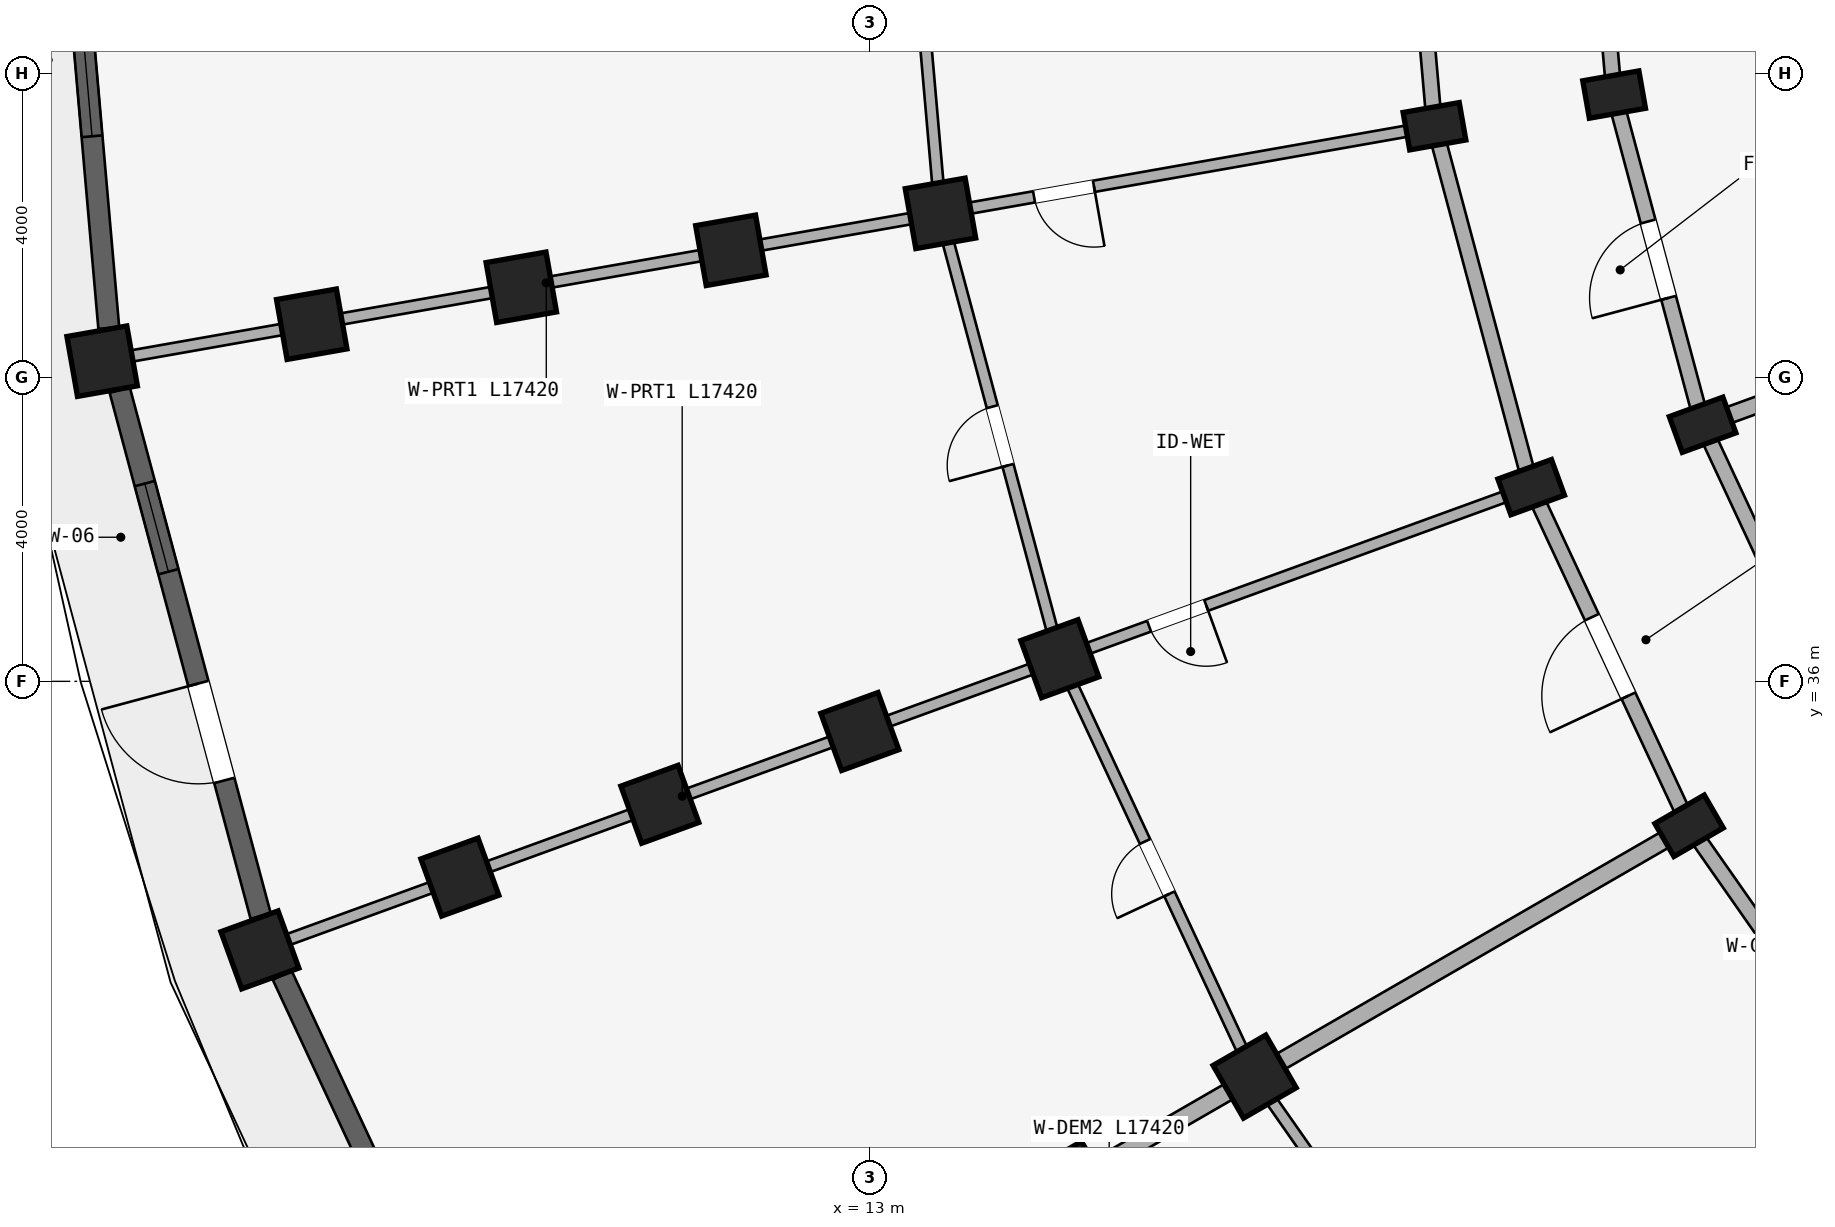
"""IFC4 building model, lengths in metres.
Left out: names, types, materials, properties, quantities, classifications, styles, units other than length and angle.
Written with IfcOpenShell. Run it as: python <this file> out.ifc"""

import sys

from ifc_helpers import new_model, si_unit, direction, frame, frame_2d, origin, origin_2d, place, context, subcontext, project, spatial, rectangle, extrude, element, fill, save


model = new_model("IFC4")
c1 = context("Model", 3, precision=1e-05, world=origin(), true_north=direction((0.0, 1.0)))
c2 = subcontext(c1, "Body", "Model", "MODEL_VIEW")
j1 = project(units=[si_unit("LENGTHUNIT", "METRE"), si_unit("PLANEANGLEUNIT", "RADIAN")], contexts=[c1])
p1 = place(None, origin())
s1 = spatial("IfcSite", under=j1, at=p1, CompositionType="ELEMENT")
p2 = place(p1, origin())
s2 = spatial("IfcBuilding", under=s1, at=p2, CompositionType="ELEMENT")
p3 = place(p2, frame((0.0, 0.0, 8.7)))
s3 = spatial("IfcBuildingStorey", under=s2, at=p3, CompositionType="ELEMENT", Elevation=8.7)
p4 = place(p3, frame((23.778, 34.1, 0.0), z_axis=(0.0, 0.0, 1.0), x_axis=(-0.5, 0.866025403784, 0.0)))
e1 = element("IfcColumn", 1, at=p4, inside=s3, PredefinedType="COLUMN", context=c2, shape_type="SweptSolid", body=[
    extrude(rectangle(XDim=0.5, YDim=0.75, at=origin_2d()), origin(), (0.0, 0.0, 1.0), 2.93),
])
for number, where, z_axis, x_axis in (
    (2, (18.062, 30.8, 0.0), (0.0, 0.0, 1.0), (-0.5, 0.866, 0.0)),
    (3, (15.637, 29.4, 0.0), (0.0, 0.0, 1.0), (-0.5, 0.866, 0.0)),
):
    element("IfcColumn", number, at=place(p3, frame(where, z_axis=z_axis, x_axis=x_axis)), inside=s3, PredefinedType="COLUMN", context=c2, shape_type="SweptSolid", body=[
        extrude(rectangle(XDim=0.8, YDim=0.8, at=origin_2d()), origin(), (0.0, 0.0, 1.0), 2.93),
    ])
for number, where, z_axis, x_axis in (
    (4, (23.956, 39.376, 0.0), (0.0, 0.0, 1.0), (-0.342, 0.94, 0.0)),
    (5, (21.701, 38.555, 0.0), (0.0, 0.0, 1.0), (-0.342, 0.94, 0.0)),
):
    element("IfcColumn", number, at=place(p3, frame(where, z_axis=z_axis, x_axis=x_axis)), inside=s3, PredefinedType="COLUMN", context=c2, shape_type="SweptSolid", body=[
        extrude(rectangle(XDim=0.5, YDim=0.75, at=origin_2d()), origin(), (0.0, 0.0, 1.0), 2.93),
    ])
for number, where, z_axis, x_axis in (
    (6, (15.499, 36.298, 0.0), (0.0, 0.0, 1.0), (-0.342, 0.94, 0.0)),
    (7, (12.868, 35.34, 0.0), (0.0, 0.0, 1.0), (-0.342, 0.94, 0.0)),
    (8, (10.236, 34.382, 0.0), (0.0, 0.0, 1.0), (-0.342, 0.94, 0.0)),
    (9, (7.605, 33.425, 0.0), (0.0, 0.0, 1.0), (-0.342, 0.94, 0.0)),
    (10, (4.974, 32.467, 0.0), (0.0, 0.0, 1.0), (-0.342, 0.94, 0.0)),
):
    element("IfcColumn", number, at=place(p3, frame(where, z_axis=z_axis, x_axis=x_axis)), inside=s3, PredefinedType="COLUMN", context=c2, shape_type="SweptSolid", body=[
        extrude(rectangle(XDim=0.8, YDim=0.8, at=origin_2d()), origin(), (0.0, 0.0, 1.0), 2.93),
    ])
for number, where, z_axis, x_axis in (
    (11, (22.792, 43.72, 0.0), (0.0, 0.0, 1.0), (-0.174, 0.985, 0.0)),
    (12, (20.428, 43.303, 0.0), (0.0, 0.0, 1.0), (-0.174, 0.985, 0.0)),
):
    element("IfcColumn", number, at=place(p3, frame(where, z_axis=z_axis, x_axis=x_axis)), inside=s3, PredefinedType="COLUMN", context=c2, shape_type="SweptSolid", body=[
        extrude(rectangle(XDim=0.5, YDim=0.75, at=origin_2d()), origin(), (0.0, 0.0, 1.0), 2.93),
    ])
for number, where, z_axis, x_axis in (
    (13, (13.929, 42.157, 0.0), (0.0, 0.0, 1.0), (-0.174, 0.985, 0.0)),
    (14, (11.171, 41.671, 0.0), (0.0, 0.0, 1.0), (-0.174, 0.985, 0.0)),
    (15, (8.414, 41.185, 0.0), (0.0, 0.0, 1.0), (-0.174, 0.985, 0.0)),
    (16, (5.656, 40.698, 0.0), (0.0, 0.0, 1.0), (-0.174, 0.985, 0.0)),
    (17, (2.899, 40.212, 0.0), (0.0, 0.0, 1.0), (-0.174, 0.985, 0.0)),
):
    element("IfcColumn", number, at=place(p3, frame(where, z_axis=z_axis, x_axis=x_axis)), inside=s3, PredefinedType="COLUMN", context=c2, shape_type="SweptSolid", body=[
        extrude(rectangle(XDim=0.8, YDim=0.8, at=origin_2d()), origin(), (0.0, 0.0, 1.0), 2.93),
    ])
p5 = place(p3, frame((26.598, 30.073, 0.0), z_axis=(0.0, 0.0, 1.0), x_axis=(-0.573592335331, 0.819140911474, 0.0)))
e18 = element("IfcWall", 18, at=p5, inside=s3, PredefinedType="STANDARD", context=c2, shape_type="SweptSolid", body=[
    extrude(rectangle(XDim=4.916, YDim=0.2, at=frame_2d((2.458, 0.0))), origin(), (0.0, 0.0, 1.0), 2.372),
])
p6 = place(p3, frame((25.856, 35.3, 0.0), z_axis=(0.0, 0.0, 1.0), x_axis=(-0.422617978463, 0.906307919131, 0.0)))
e19 = element("IfcWall", 19, at=p6, inside=s3, PredefinedType="STANDARD", context=c2, shape_type="SweptSolid", body=[
    extrude(rectangle(XDim=4.497, YDim=0.2, at=frame_2d((2.249, 0.0))), origin(), (0.0, 0.0, 1.0), 2.372),
])
p7 = place(p3, frame((23.778, 34.1, 0.0), z_axis=(0.0, 0.0, 1.0), x_axis=(-0.422629854778, 0.906302381024, 0.0)))
e20 = element("IfcWall", 20, at=p7, inside=s3, PredefinedType="STANDARD", context=c2, shape_type="SweptSolid", body=[
    extrude(rectangle(XDim=4.915, YDim=0.2, at=frame_2d((2.458, 0.0))), origin(), (0.0, 0.0, 1.0), 2.372),
])
p8 = place(p7, frame((1.888, 0.0, 0.0)))
e21 = element("IfcOpeningElement", 21, at=p8, cuts=e20, PredefinedType="OPENING", context=c2, shape_type="SweptSolid", body=[
    extrude(rectangle(XDim=1.14, YDim=2.15, at=frame_2d((0.57, 1.075))), frame((0.0, 0.11, 0.0), z_axis=(0.0, -1.0, 0.0), x_axis=(1.0, 0.0, 0.0)), (0.0, 0.0, 1.0), 0.22),
])
p9 = place(p3, frame((23.956, 39.376, 0.0), z_axis=(0.0, 0.0, 1.0), x_axis=(-0.258787642463, 0.965934240054, 0.0)))
e22 = element("IfcWall", 22, at=p9, inside=s3, PredefinedType="STANDARD", context=c2, shape_type="SweptSolid", body=[
    extrude(rectangle(XDim=4.497, YDim=0.2, at=frame_2d((2.249, 0.0))), origin(), (0.0, 0.0, 1.0), 2.372),
])
p10 = place(p9, frame((1.729, 0.0, 0.0)))
e23 = element("IfcOpeningElement", 23, at=p10, cuts=e22, PredefinedType="OPENING", context=c2, shape_type="SweptSolid", body=[
    extrude(rectangle(XDim=1.04, YDim=2.15, at=frame_2d((0.52, 1.075))), frame((0.0, 0.11, 0.0), z_axis=(0.0, -1.0, 0.0), x_axis=(1.0, 0.0, 0.0)), (0.0, 0.0, 1.0), 0.22),
])
p11 = place(p3, frame((21.701, 38.555, 0.0), z_axis=(0.0, 0.0, 1.0), x_axis=(-0.258803112091, 0.965930095386, 0.0)))
e24 = element("IfcWall", 24, at=p11, inside=s3, PredefinedType="STANDARD", context=c2, shape_type="SweptSolid", body=[
    extrude(rectangle(XDim=4.916, YDim=0.2, at=frame_2d((2.458, 0.0))), origin(), (0.0, 0.0, 1.0), 2.372),
])
p12 = place(p3, frame((22.792, 43.72, 0.0), z_axis=(0.0, 0.0, 1.0), x_axis=(-0.087187153726, 0.996191949488, 0.0)))
e25 = element("IfcWall", 25, at=p12, inside=s3, PredefinedType="STANDARD", context=c2, shape_type="SweptSolid", body=[
    extrude(rectangle(XDim=4.497, YDim=0.2, at=frame_2d((2.249, 0.0))), origin(), (0.0, 0.0, 1.0), 2.372),
])
p13 = place(p3, frame((20.428, 43.303, 0.0), z_axis=(0.0, 0.0, 1.0), x_axis=(-0.087167566415, 0.996193663584, 0.0)))
e26 = element("IfcWall", 26, at=p13, inside=s3, PredefinedType="STANDARD", context=c2, shape_type="SweptSolid", body=[
    extrude(rectangle(XDim=4.916, YDim=0.2, at=frame_2d((2.458, 0.0))), origin(), (0.0, 0.0, 1.0), 2.372),
])
p14 = place(p3, frame((26.521, 30.009, 0.0), z_axis=(0.0, 0.0, 1.0), x_axis=(-0.766046835987, -0.642784757967, 0.0)))
e27 = element("IfcWall", 27, at=p14, inside=s3, PredefinedType="PARTITIONING", context=c2, shape_type="SweptSolid", body=[
    extrude(rectangle(XDim=17.42, YDim=0.15, at=frame_2d((8.71, 0.0))), origin(), (0.0, 0.0, 1.0), 2.372),
])
p15 = place(p14, frame((4.45, 0.0, 0.0)))
e28 = element("IfcOpeningElement", 28, at=p15, cuts=e27, PredefinedType="OPENING", context=c2, shape_type="SweptSolid", body=[
    extrude(rectangle(XDim=0.8, YDim=2.1, at=frame_2d((0.4, 1.05))), frame((0.0, 0.085, 0.0), z_axis=(0.0, -1.0, 0.0), x_axis=(1.0, 0.0, 0.0)), (0.0, 0.0, 1.0), 0.17),
])
p16 = place(p3, frame((23.691, 34.05, 0.0), z_axis=(0.0, 0.0, 1.0), x_axis=(-0.866026648973, -0.499997843263, 0.0)))
e29 = element("IfcWall", 29, at=p16, inside=s3, PredefinedType="STANDARD", context=c2, shape_type="SweptSolid", body=[
    extrude(rectangle(XDim=17.42, YDim=0.23, at=frame_2d((8.71, 0.0))), origin(), (0.0, 0.0, 1.0), 2.372),
])
p17 = place(p3, frame((30.346, 41.702, 0.0), z_axis=(0.0, 0.0, 1.0), x_axis=(-0.939696231917, -0.342010221662, 0.0)))
e30 = element("IfcWall", 30, at=p17, inside=s3, PredefinedType="STANDARD", context=c2, shape_type="SweptSolid", body=[
    extrude(rectangle(XDim=6.75, YDim=0.22, at=frame_2d((3.375, 0.0))), origin(), (0.0, 0.0, 1.0), 2.372),
])
p18 = place(p3, frame((21.607, 38.521, 0.0), z_axis=(0.0, 0.0, 1.0), x_axis=(-0.939691901159, -0.342022120477, 0.0)))
e31 = element("IfcWall", 31, at=p18, inside=s3, PredefinedType="PARTITIONING", context=c2, shape_type="SweptSolid", body=[
    extrude(rectangle(XDim=17.42, YDim=0.15, at=frame_2d((8.71, 0.0))), origin(), (0.0, 0.0, 1.0), 2.372),
])
p19 = place(p18, frame((4.45, 0.0, 0.0)))
e32 = element("IfcOpeningElement", 32, at=p19, cuts=e31, PredefinedType="OPENING", context=c2, shape_type="SweptSolid", body=[
    extrude(rectangle(XDim=0.8, YDim=2.1, at=frame_2d((0.4, 1.05))), frame((0.0, 0.085, 0.0), z_axis=(0.0, -1.0, 0.0), x_axis=(1.0, 0.0, 0.0)), (0.0, 0.0, 1.0), 0.17),
])
p20 = place(p3, frame((20.33, 43.286, 0.0), z_axis=(0.0, 0.0, 1.0), x_axis=(-0.984808098809, -0.173646216546, 0.0)))
e33 = element("IfcWall", 33, at=p20, inside=s3, PredefinedType="PARTITIONING", context=c2, shape_type="SweptSolid", body=[
    extrude(rectangle(XDim=17.42, YDim=0.15, at=frame_2d((8.71, 0.0))), origin(), (0.0, 0.0, 1.0), 2.372),
])
p21 = place(p20, frame((4.45, 0.0, 0.0)))
e34 = element("IfcOpeningElement", 34, at=p21, cuts=e33, PredefinedType="OPENING", context=c2, shape_type="SweptSolid", body=[
    extrude(rectangle(XDim=0.8, YDim=2.1, at=frame_2d((0.4, 1.05))), frame((0.0, 0.085, 0.0), z_axis=(0.0, -1.0, 0.0), x_axis=(1.0, 0.0, 0.0)), (0.0, 0.0, 1.0), 0.17),
])
p22 = place(p3, frame((21.542, 25.831, 0.0), z_axis=(0.0, 0.0, 1.0), x_axis=(-0.573594691504, 0.81913926159, 0.0)))
e35 = element("IfcWall", 35, at=p22, inside=s3, PredefinedType="PLUMBINGWALL", context=c2, shape_type="SweptSolid", body=[
    extrude(rectangle(XDim=6.066, YDim=0.15, at=frame_2d((3.033, 0.0))), origin(), (0.0, 0.0, 1.0), 2.372),
])
p23 = place(p22, frame((2.613, 0.0, 0.0)))
e36 = element("IfcOpeningElement", 36, at=p23, cuts=e35, PredefinedType="OPENING", context=c2, shape_type="SweptSolid", body=[
    extrude(rectangle(XDim=0.84, YDim=2.1, at=frame_2d((0.42, 1.05))), frame((0.0, 0.085, 0.0), z_axis=(0.0, -1.0, 0.0), x_axis=(1.0, 0.0, 0.0)), (0.0, 0.0, 1.0), 0.17),
])
p24 = place(p3, frame((18.062, 30.8, 0.0), z_axis=(0.0, 0.0, 1.0), x_axis=(-0.42260781991, 0.906312656069, 0.0)))
e37 = element("IfcWall", 37, at=p24, inside=s3, PredefinedType="PLUMBINGWALL", context=c2, shape_type="SweptSolid", body=[
    extrude(rectangle(XDim=6.066, YDim=0.15, at=frame_2d((3.033, 0.0))), origin(), (0.0, 0.0, 1.0), 2.372),
])
p25 = place(p24, frame((2.653, 0.0, 0.0)))
e38 = element("IfcOpeningElement", 38, at=p25, cuts=e37, PredefinedType="OPENING", context=c2, shape_type="SweptSolid", body=[
    extrude(rectangle(XDim=0.76, YDim=2.05, at=frame_2d((0.38, 1.025))), frame((0.0, 0.085, 0.0), z_axis=(0.0, -1.0, 0.0), x_axis=(1.0, 0.0, 0.0)), (0.0, 0.0, 1.0), 0.17),
])
p26 = place(p3, frame((15.499, 36.298, 0.0), z_axis=(0.0, 0.0, 1.0), x_axis=(-0.258827283048, 0.965923618901, 0.0)))
e39 = element("IfcWall", 39, at=p26, inside=s3, PredefinedType="PLUMBINGWALL", context=c2, shape_type="SweptSolid", body=[
    extrude(rectangle(XDim=6.066, YDim=0.15, at=frame_2d((3.033, 0.0))), origin(), (0.0, 0.0, 1.0), 2.372),
])
p27 = place(p26, frame((2.633, 0.0, 0.0)))
e40 = element("IfcOpeningElement", 40, at=p27, cuts=e39, PredefinedType="OPENING", context=c2, shape_type="SweptSolid", body=[
    extrude(rectangle(XDim=0.8, YDim=2.1, at=frame_2d((0.4, 1.05))), frame((0.0, 0.085, 0.0), z_axis=(0.0, -1.0, 0.0), x_axis=(1.0, 0.0, 0.0)), (0.0, 0.0, 1.0), 0.17),
])
p28 = place(p3, frame((13.929, 42.157, 0.0), z_axis=(0.0, 0.0, 1.0), x_axis=(-0.087174938512, 0.996193018494, 0.0)))
e41 = element("IfcWall", 41, at=p28, inside=s3, PredefinedType="PLUMBINGWALL", context=c2, shape_type="SweptSolid", body=[
    extrude(rectangle(XDim=6.066, YDim=0.15, at=frame_2d((3.033, 0.0))), origin(), (0.0, 0.0, 1.0), 2.372),
])
p29 = place(p28, frame((2.613, 0.0, 0.0)))
e42 = element("IfcOpeningElement", 42, at=p29, cuts=e41, PredefinedType="OPENING", context=c2, shape_type="SweptSolid", body=[
    extrude(rectangle(XDim=0.84, YDim=2.1, at=frame_2d((0.42, 1.05))), frame((0.0, 0.085, 0.0), z_axis=(0.0, -1.0, 0.0), x_axis=(1.0, 0.0, 0.0)), (0.0, 0.0, 1.0), 0.17),
])
p30 = place(p3, frame((8.296, 25.64, 0.0), z_axis=(0.0, 0.0, 1.0), x_axis=(-0.422633596215, 0.906300636296, 0.0)))
e43 = element("IfcWall", 43, at=p30, inside=s3, PredefinedType="STANDARD", context=c2, shape_type="SweptSolid", body=[
    extrude(rectangle(XDim=7.164, YDim=0.275, at=frame_2d((3.582, 0.0))), origin(), (0.0, 0.0, 1.0), 2.472),
])
p31 = place(p30, frame((2.757, 0.0, 0.522)))
e44 = element("IfcOpeningElement", 44, at=p31, cuts=e43, PredefinedType="OPENING", context=c2, shape_type="SweptSolid", body=[
    extrude(rectangle(XDim=1.65, YDim=1.75, at=frame_2d((0.825, 0.875))), frame((0.0, 0.147, 0.0), z_axis=(0.0, -1.0, 0.0), x_axis=(1.0, 0.0, 0.0)), (0.0, 0.0, 1.0), 0.295),
])
p32 = place(p3, frame((4.984, 32.912, 0.0), z_axis=(0.0, 0.0, 1.0), x_axis=(-0.258826933296, 0.965923712619, 0.0)))
e45 = element("IfcWall", 45, at=p32, inside=s3, PredefinedType="STANDARD", context=c2, shape_type="SweptSolid", body=[
    extrude(rectangle(XDim=7.164, YDim=0.275, at=frame_2d((3.582, 0.0))), origin(), (0.0, 0.0, 1.0), 2.472),
])
p33 = place(p32, frame((4.69, 0.0, 0.322)))
e46 = element("IfcOpeningElement", 46, at=p33, cuts=e45, PredefinedType="OPENING", context=c2, shape_type="SweptSolid", body=[
    extrude(rectangle(XDim=1.2, YDim=1.5, at=frame_2d((0.6, 0.75))), frame((0.0, 0.147, 0.0), z_axis=(0.0, -1.0, 0.0), x_axis=(1.0, 0.0, 0.0)), (0.0, 0.0, 1.0), 0.295),
])
p34 = place(p32, frame((1.847, 0.0, 0.0)))
e47 = element("IfcOpeningElement", 47, at=p34, cuts=e45, PredefinedType="OPENING", context=c2, shape_type="SweptSolid", body=[
    extrude(rectangle(XDim=1.32, YDim=2.15, at=frame_2d((0.66, 1.075))), frame((0.0, 0.147, 0.0), z_axis=(0.0, -1.0, 0.0), x_axis=(1.0, 0.0, 0.0)), (0.0, 0.0, 1.0), 0.295),
])
p35 = place(p3, frame((2.986, 40.649, 0.0), z_axis=(0.0, 0.0, 1.0), x_axis=(-0.08713989423, 0.99619608453, 0.0)))
e48 = element("IfcWall", 48, at=p35, inside=s3, PredefinedType="STANDARD", context=c2, shape_type="SweptSolid", body=[
    extrude(rectangle(XDim=7.164, YDim=0.275, at=frame_2d((3.582, 0.0))), origin(), (0.0, 0.0, 1.0), 2.472),
])
p36 = place(p35, frame((2.532, 0.0, 0.472)))
e49 = element("IfcOpeningElement", 49, at=p36, cuts=e48, PredefinedType="OPENING", context=c2, shape_type="SweptSolid", body=[
    extrude(rectangle(XDim=2.1, YDim=1.8, at=frame_2d((1.05, 0.9))), frame((0.0, 0.147, 0.0), z_axis=(0.0, -1.0, 0.0), x_axis=(1.0, 0.0, 0.0)), (0.0, 0.0, 1.0), 0.295),
])
p37 = place(p33, origin())
e50 = element("IfcWindow", 50, at=p37, inside=s3, PartitioningType="SINGLE_PANEL", PredefinedType="WINDOW", context=c2, shape_type="SweptSolid", body=[
    extrude(rectangle(XDim=1.2, YDim=1.5, at=frame_2d((0.6, 0.75))), frame((0.0, 0.03, 0.0), z_axis=(0.0, -1.0, 0.0), x_axis=(1.0, 0.0, 0.0)), (0.0, 0.0, 1.0), 0.06),
])
fill(e46, e50)
p38 = place(p36, origin())
e51 = element("IfcWindow", 51, at=p38, inside=s3, PartitioningType="TRIPLE_PANEL_VERTICAL", PredefinedType="WINDOW", context=c2, shape_type="SweptSolid", body=[
    extrude(rectangle(XDim=2.1, YDim=1.8, at=frame_2d((1.05, 0.9))), frame((0.0, 0.03, 0.0), z_axis=(0.0, -1.0, 0.0), x_axis=(1.0, 0.0, 0.0)), (0.0, 0.0, 1.0), 0.06),
])
fill(e49, e51)
p39 = place(p19, frame((0.8, 0.0, 0.0), z_axis=(0.0, 0.0, 1.0), x_axis=(-1.0, 0.0, 0.0)))
e52 = element("IfcDoor", 52, at=p39, inside=s3, OperationType="SINGLE_SWING_RIGHT", PredefinedType="DOOR", context=c2, shape_type="SweptSolid", body=[
    extrude(rectangle(XDim=0.8, YDim=2.1, at=frame_2d((0.4, 1.05))), frame((0.0, 0.025, 0.0), z_axis=(0.0, -1.0, 0.0), x_axis=(1.0, 0.0, 0.0)), (0.0, 0.0, 1.0), 0.05),
])
fill(e32, e52)
p40 = place(p21, origin())
e53 = element("IfcDoor", 53, at=p40, inside=s3, OperationType="SINGLE_SWING_LEFT", PredefinedType="DOOR", context=c2, shape_type="SweptSolid", body=[
    extrude(rectangle(XDim=0.8, YDim=2.1, at=frame_2d((0.4, 1.05))), frame((0.0, 0.025, 0.0), z_axis=(0.0, -1.0, 0.0), x_axis=(1.0, 0.0, 0.0)), (0.0, 0.0, 1.0), 0.05),
])
fill(e34, e53)
p41 = place(p8, origin())
e54 = element("IfcDoor", 54, at=p41, inside=s3, OperationType="SINGLE_SWING_LEFT", PredefinedType="DOOR", context=c2, shape_type="SweptSolid", body=[
    extrude(rectangle(XDim=1.14, YDim=2.15, at=frame_2d((0.57, 1.075))), frame((0.0, 0.025, 0.0), z_axis=(0.0, -1.0, 0.0), x_axis=(1.0, 0.0, 0.0)), (0.0, 0.0, 1.0), 0.05),
])
fill(e21, e54)
p42 = place(p25, frame((0.76, 0.0, 0.0), z_axis=(0.0, 0.0, 1.0), x_axis=(-1.0, 0.0, 0.0)))
e55 = element("IfcDoor", 55, at=p42, inside=s3, OperationType="SINGLE_SWING_RIGHT", PredefinedType="DOOR", context=c2, shape_type="SweptSolid", body=[
    extrude(rectangle(XDim=0.76, YDim=2.05, at=frame_2d((0.38, 1.025))), frame((0.0, 0.025, 0.0), z_axis=(0.0, -1.0, 0.0), x_axis=(1.0, 0.0, 0.0)), (0.0, 0.0, 1.0), 0.05),
])
fill(e38, e55)
p43 = place(p27, origin())
e56 = element("IfcDoor", 56, at=p43, inside=s3, OperationType="SINGLE_SWING_LEFT", PredefinedType="DOOR", context=c2, shape_type="SweptSolid", body=[
    extrude(rectangle(XDim=0.8, YDim=2.1, at=frame_2d((0.4, 1.05))), frame((0.0, 0.025, 0.0), z_axis=(0.0, -1.0, 0.0), x_axis=(1.0, 0.0, 0.0)), (0.0, 0.0, 1.0), 0.05),
])
fill(e40, e56)
p44 = place(p10, frame((1.04, 0.0, 0.0), z_axis=(0.0, 0.0, 1.0), x_axis=(-1.0, 0.0, 0.0)))
e57 = element("IfcDoor", 57, at=p44, inside=s3, OperationType="SINGLE_SWING_RIGHT", PredefinedType="DOOR", context=c2, shape_type="SweptSolid", body=[
    extrude(rectangle(XDim=1.04, YDim=2.15, at=frame_2d((0.52, 1.075))), frame((0.0, 0.025, 0.0), z_axis=(0.0, -1.0, 0.0), x_axis=(1.0, 0.0, 0.0)), (0.0, 0.0, 1.0), 0.05),
])
fill(e23, e57)
p45 = place(p34, origin())
e58 = element("IfcDoor", 58, at=p45, inside=s3, OperationType="SINGLE_SWING_RIGHT", PredefinedType="DOOR", context=c2, shape_type="SweptSolid", body=[
    extrude(rectangle(XDim=1.32, YDim=2.15, at=frame_2d((0.66, 1.075))), frame((0.0, 0.025, 0.0), z_axis=(0.0, -1.0, 0.0), x_axis=(1.0, 0.0, 0.0)), (0.0, 0.0, 1.0), 0.05),
])
fill(e47, e58)
save(model, sys.argv[1])
